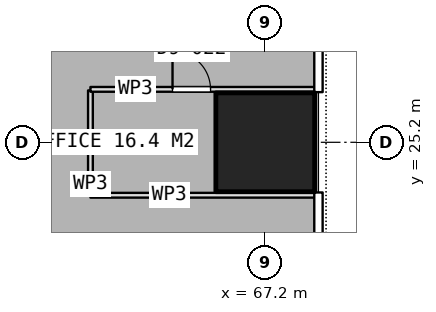
"""IFC4 building model, lengths in metres.
Left out: names, types, materials, properties, quantities, classifications, styles, units other than length and angle.
Written with IfcOpenShell. Run it as: python <this file> out.ifc"""

import sys

from ifc_helpers import new_model, si_unit, direction, frame, frame_2d, origin, origin_2d, place, context, subcontext, project, spatial, rectangle, extrude, element, fill, save


model = new_model("IFC4")
c1 = context("Model", 3, precision=1e-05, world=origin(), true_north=direction((0.0, 1.0)))
c2 = subcontext(c1, "Body", "Model", "MODEL_VIEW")
j1 = project(units=[si_unit("LENGTHUNIT", "METRE"), si_unit("PLANEANGLEUNIT", "RADIAN")], contexts=[c1])
p1 = place(None, origin())
s1 = spatial("IfcSite", under=j1, at=p1, CompositionType="ELEMENT")
p2 = place(p1, origin())
s2 = spatial("IfcBuilding", under=s1, at=p2, CompositionType="ELEMENT")
p3 = place(p2, frame((0.0, 0.0, 25.4)))
s3 = spatial("IfcBuildingStorey", under=s2, at=p3, CompositionType="ELEMENT", Elevation=25.4)
p4 = place(p3, frame((67.2, 25.2, 0.0), z_axis=(0.0, 0.0, 1.0), x_axis=(1.0, 0.0, 0.0)))
e1 = element("IfcColumn", 1, at=p4, inside=s3, PredefinedType="COLUMN", context=c2, shape_type="SweptSolid", body=[
    extrude(rectangle(XDim=2.6, YDim=2.6, at=origin_2d()), origin(), (0.0, 0.0, 1.0), 3.75),
])
p5 = place(p3, frame((62.6, 23.836, 0.0), z_axis=(0.0, 0.0, 1.0), x_axis=(0.0, 1.0, 0.0)))
e2 = element("IfcWall", 2, at=p5, inside=s3, PredefinedType="PARTITIONING", context=c2, shape_type="SweptSolid", body=[
    extrude(rectangle(XDim=2.729, YDim=0.125, at=frame_2d((1.365, 0.0))), origin(), (0.0, 0.0, 1.0), 3.5),
])
p6 = place(p3, frame((62.6, 26.593, 0.0), z_axis=(0.0, 0.0, 1.0), x_axis=(1.0, 0.0, 0.0)))
e3 = element("IfcWall", 3, at=p6, inside=s3, PredefinedType="PARTITIONING", context=c2, shape_type="SweptSolid", body=[
    extrude(rectangle(XDim=5.92, YDim=0.125, at=frame_2d((2.96, 0.0))), origin(), (0.0, 0.0, 1.0), 3.5),
])
p7 = place(p6, frame((2.16, 0.0, 0.0)))
e4 = element("IfcOpeningElement", 4, at=p7, cuts=e3, PredefinedType="OPENING", context=c2, shape_type="SweptSolid", body=[
    extrude(rectangle(XDim=1.0, YDim=2.1, at=frame_2d((0.5, 1.05))), frame((0.0, 0.073, 0.0), z_axis=(0.0, -1.0, 0.0), x_axis=(1.0, 0.0, 0.0)), (0.0, 0.0, 1.0), 0.145),
])
p8 = place(p3, frame((68.52, 23.807, 0.0), z_axis=(0.0, 0.0, 1.0), x_axis=(-1.0, 0.0, 0.0)))
e5 = element("IfcWall", 5, at=p8, inside=s3, PredefinedType="PARTITIONING", context=c2, shape_type="SweptSolid", body=[
    extrude(rectangle(XDim=5.92, YDim=0.125, at=frame_2d((2.96, 0.0))), origin(), (0.0, 0.0, 1.0), 3.5),
])
p9 = place(p7, origin())
e6 = element("IfcDoor", 6, at=p9, inside=s3, OperationType="SINGLE_SWING_LEFT", PredefinedType="DOOR", context=c2, shape_type="SweptSolid", body=[
    extrude(rectangle(XDim=1.0, YDim=2.1, at=frame_2d((0.5, 1.05))), frame((0.0, 0.025, 0.0), z_axis=(0.0, -1.0, 0.0), x_axis=(1.0, 0.0, 0.0)), (0.0, 0.0, 1.0), 0.05),
])
fill(e4, e6)
save(model, sys.argv[1])
